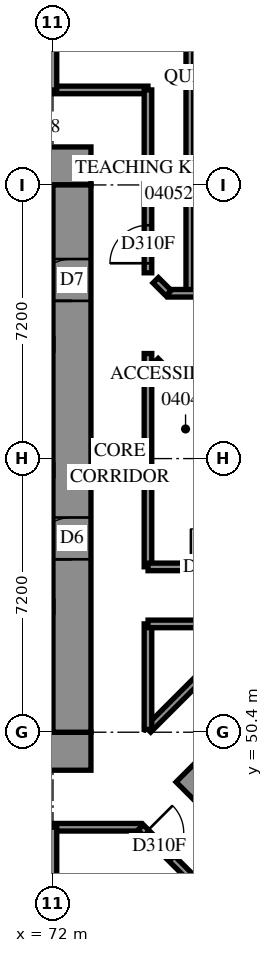
"""IFC4 building model, lengths in metres.
Left out: names, types, materials, properties, quantities, classifications, styles, units other than length and angle.
Written with IfcOpenShell. Run it as: python <this file> out.ifc"""

import sys

from ifc_helpers import new_model, si_unit, direction, frame, frame_2d, origin, place, context, subcontext, project, spatial, rectangle, extrude, element, fill, save


model = new_model("IFC4")
c1 = context("Model", 3, precision=1e-05, world=origin(), true_north=direction((0.0, 1.0)))
c2 = subcontext(c1, "Body", "Model", "MODEL_VIEW")
j1 = project(units=[si_unit("LENGTHUNIT", "METRE"), si_unit("PLANEANGLEUNIT", "RADIAN")], contexts=[c1])
p1 = place(None, origin())
s1 = spatial("IfcSite", under=j1, at=p1, CompositionType="ELEMENT")
p2 = place(p1, origin())
s2 = spatial("IfcBuilding", under=s1, at=p2, CompositionType="ELEMENT")
p3 = place(p2, frame((0.0, 0.0, 18.6)))
s3 = spatial("IfcBuildingStorey", under=s2, at=p3, CompositionType="ELEMENT", Elevation=18.6)
p4 = place(p3, frame((56.6, 49.9, -0.4), z_axis=(0.0, 0.0, 1.0), x_axis=(1.0, 0.0, 0.0)))
e1 = element("IfcWall", 1, at=p4, inside=s3, PredefinedType="SHEAR", context=c2, shape_type="SweptSolid", body=[
    extrude(rectangle(XDim=16.4, YDim=1.0, at=frame_2d((8.2, 0.0))), origin(), (0.0, 0.0, 1.0), 3.5),
])
p5 = place(p3, frame((56.6, 65.3, -0.4), z_axis=(0.0, 0.0, 1.0), x_axis=(1.0, 0.0, 0.0)))
e2 = element("IfcWall", 2, at=p5, inside=s3, PredefinedType="SHEAR", context=c2, shape_type="SweptSolid", body=[
    extrude(rectangle(XDim=16.4, YDim=1.0, at=frame_2d((8.2, 0.0))), origin(), (0.0, 0.0, 1.0), 3.5),
])
p6 = place(p5, frame((11.0, 0.0, 0.4)))
e3 = element("IfcOpeningElement", 3, at=p6, cuts=e2, PredefinedType="OPENING", context=c2, shape_type="SweptSolid", body=[
    extrude(rectangle(XDim=0.8, YDim=2.1, at=frame_2d((0.4, 1.05))), frame((0.0, 0.51, 0.0), z_axis=(0.0, -1.0, 0.0), x_axis=(1.0, 0.0, 0.0)), (0.0, 0.0, 1.0), 1.02),
])
p7 = place(p3, frame((72.5, 50.4, -0.4), z_axis=(0.0, 0.0, 1.0), x_axis=(0.0, 1.0, 0.0)))
e4 = element("IfcWall", 4, at=p7, inside=s3, PredefinedType="SHEAR", context=c2, shape_type="SweptSolid", body=[
    extrude(rectangle(XDim=14.4, YDim=1.0, at=frame_2d((7.2, 0.0))), origin(), (0.0, 0.0, 1.0), 3.5),
])
p8 = place(p7, frame((4.55, 0.0, 0.4)))
e5 = element("IfcOpeningElement", 5, at=p8, cuts=e4, PredefinedType="OPENING", context=c2, shape_type="SweptSolid", body=[
    extrude(rectangle(XDim=1.1, YDim=2.1, at=frame_2d((0.55, 1.05))), frame((0.0, 0.51, 0.0), z_axis=(0.0, -1.0, 0.0), x_axis=(1.0, 0.0, 0.0)), (0.0, 0.0, 1.0), 1.02),
])
p9 = place(p7, frame((11.35, 0.0, 0.4)))
e6 = element("IfcOpeningElement", 6, at=p9, cuts=e4, PredefinedType="OPENING", context=c2, shape_type="SweptSolid", body=[
    extrude(rectangle(XDim=1.1, YDim=2.1, at=frame_2d((0.55, 1.05))), frame((0.0, 0.51, 0.0), z_axis=(0.0, -1.0, 0.0), x_axis=(1.0, 0.0, 0.0)), (0.0, 0.0, 1.0), 1.02),
])
p10 = place(p3, frame((75.594, 49.443, -0.4), z_axis=(0.0, 0.0, 1.0), x_axis=(0.7071037324, -0.70710983, 0.0)))
e7 = element("IfcWall", 7, at=p10, inside=s3, PredefinedType="SHEAR", context=c2, shape_type="SweptSolid", body=[
    extrude(rectangle(XDim=16.4, YDim=1.0, at=frame_2d((8.2, 0.0))), origin(), (0.0, 0.0, 1.0), 3.5),
])
p11 = place(p3, frame((55.1, 67.3, 0.0), z_axis=(0.0, 0.0, 1.0), x_axis=(1.0, 0.0, 0.0)))
e8 = element("IfcWall", 8, at=p11, inside=s3, PredefinedType="PARTITIONING", context=c2, shape_type="SweptSolid", body=[
    extrude(rectangle(XDim=19.4, YDim=0.2, at=frame_2d((9.7, 0.0))), origin(), (0.0, 0.0, 1.0), 3.8),
])
p12 = place(p11, frame((6.058, 0.0, 0.0)))
e9 = element("IfcOpeningElement", 9, at=p12, cuts=e8, PredefinedType="OPENING", context=c2, shape_type="SweptSolid", body=[
    extrude(rectangle(XDim=1.0, YDim=2.1, at=frame_2d((0.5, 1.05))), frame((0.0, 0.11, 0.0), z_axis=(0.0, -1.0, 0.0), x_axis=(1.0, 0.0, 0.0)), (0.0, 0.0, 1.0), 0.22),
])
p13 = place(p11, frame((13.562, 0.0, 0.0)))
e10 = element("IfcOpeningElement", 10, at=p13, cuts=e8, PredefinedType="OPENING", context=c2, shape_type="SweptSolid", body=[
    extrude(rectangle(XDim=1.0, YDim=2.1, at=frame_2d((0.5, 1.05))), frame((0.0, 0.11, 0.0), z_axis=(0.0, -1.0, 0.0), x_axis=(1.0, 0.0, 0.0)), (0.0, 0.0, 1.0), 0.22),
])
p14 = place(p3, frame((55.1, 47.9, 0.0), z_axis=(0.0, 0.0, 1.0), x_axis=(1.0, 0.0, 0.0)))
e11 = element("IfcWall", 11, at=p14, inside=s3, PredefinedType="PARTITIONING", context=c2, shape_type="SweptSolid", body=[
    extrude(rectangle(XDim=19.208, YDim=0.2, at=frame_2d((9.604, 0.0))), origin(), (0.0, 0.0, 1.0), 3.8),
])
p15 = place(p14, frame((6.058, 0.0, 0.0)))
e12 = element("IfcOpeningElement", 12, at=p15, cuts=e11, PredefinedType="OPENING", context=c2, shape_type="SweptSolid", body=[
    extrude(rectangle(XDim=1.0, YDim=2.1, at=frame_2d((0.5, 1.05))), frame((0.0, 0.11, 0.0), z_axis=(0.0, -1.0, 0.0), x_axis=(1.0, 0.0, 0.0)), (0.0, 0.0, 1.0), 0.22),
])
p16 = place(p14, frame((13.258, 0.0, 0.0)))
e13 = element("IfcOpeningElement", 13, at=p16, cuts=e11, PredefinedType="OPENING", context=c2, shape_type="SweptSolid", body=[
    extrude(rectangle(XDim=1.0, YDim=2.1, at=frame_2d((0.5, 1.05))), frame((0.0, 0.11, 0.0), z_axis=(0.0, -1.0, 0.0), x_axis=(1.0, 0.0, 0.0)), (0.0, 0.0, 1.0), 0.22),
])
p17 = place(p3, frame((75.6, 61.95, 0.0), z_axis=(0.0, 0.0, 1.0), x_axis=(0.0, 1.0, 0.0)))
e14 = element("IfcWall", 14, at=p17, inside=s3, PredefinedType="PARTITIONING", context=c2, shape_type="SweptSolid", body=[
    extrude(rectangle(XDim=10.7, YDim=0.2, at=frame_2d((5.35, 0.0))), origin(), (0.0, 0.0, 1.0), 3.8),
])
p18 = place(p3, frame((74.5, 54.752, 0.0), z_axis=(0.0, 0.0, 1.0), x_axis=(0.0, 1.0, 0.0)))
e15 = element("IfcWall", 15, at=p18, inside=s3, PredefinedType="PARTITIONING", context=c2, shape_type="SweptSolid", body=[
    extrude(rectangle(XDim=5.612, YDim=0.2, at=frame_2d((2.806, 0.0))), origin(), (0.0, 0.0, 1.0), 3.8),
])
p19 = place(p3, frame((74.5, 62.488, 0.0), z_axis=(0.0, 0.0, 1.0), x_axis=(0.0, 1.0, 0.0)))
e16 = element("IfcWall", 16, at=p19, inside=s3, PredefinedType="PARTITIONING", context=c2, shape_type="SweptSolid", body=[
    extrude(rectangle(XDim=4.812, YDim=0.2, at=frame_2d((2.406, 0.0))), origin(), (0.0, 0.0, 1.0), 3.8),
])
p20 = place(p19, frame((0.252, 0.0, 0.0)))
e17 = element("IfcOpeningElement", 17, at=p20, cuts=e16, PredefinedType="OPENING", context=c2, shape_type="SweptSolid", body=[
    extrude(rectangle(XDim=1.0, YDim=2.1, at=frame_2d((0.5, 1.05))), frame((0.0, 0.11, 0.0), z_axis=(0.0, -1.0, 0.0), x_axis=(1.0, 0.0, 0.0)), (0.0, 0.0, 1.0), 0.22),
])
p21 = place(p3, frame((74.305, 47.897, 0.0), z_axis=(0.0, 0.0, 1.0), x_axis=(0.7071067812, -0.7071067812, 0.0)))
e18 = element("IfcWall", 18, at=p21, inside=s3, PredefinedType="PARTITIONING", context=c2, shape_type="SweptSolid", body=[
    extrude(rectangle(XDim=4.302, YDim=0.2, at=frame_2d((2.151, 0.0))), origin(), (0.0, 0.0, 1.0), 3.8),
])
p22 = place(p21, frame((0.192, 0.0, 0.0)))
e19 = element("IfcOpeningElement", 19, at=p22, cuts=e18, PredefinedType="OPENING", context=c2, shape_type="SweptSolid", body=[
    extrude(rectangle(XDim=1.0, YDim=2.1, at=frame_2d((0.5, 1.05))), frame((0.0, 0.11, 0.0), z_axis=(0.0, -1.0, 0.0), x_axis=(1.0, 0.0, 0.0)), (0.0, 0.0, 1.0), 0.22),
])
p23 = place(p3, frame((74.502, 54.75, 0.0), z_axis=(0.0, 0.0, 1.0), x_axis=(1.0, 0.0, 0.0)))
e20 = element("IfcWall", 20, at=p23, inside=s3, PredefinedType="PARTITIONING", context=c2, shape_type="SweptSolid", body=[
    extrude(rectangle(XDim=4.276, YDim=0.2, at=frame_2d((2.138, 0.0))), origin(), (0.0, 0.0, 1.0), 3.8),
])
p24 = place(p23, frame((1.129, 0.0, 0.0)))
e21 = element("IfcOpeningElement", 21, at=p24, cuts=e20, PredefinedType="OPENING", context=c2, shape_type="SweptSolid", body=[
    extrude(rectangle(XDim=1.0, YDim=2.1, at=frame_2d((0.5, 1.05))), frame((0.0, 0.11, 0.0), z_axis=(0.0, -1.0, 0.0), x_axis=(1.0, 0.0, 0.0)), (0.0, 0.0, 1.0), 0.22),
])
p25 = place(p3, frame((75.038, 61.95, 0.0), z_axis=(0.0, 0.0, 1.0), x_axis=(1.0, 0.0, 0.0)))
e22 = element("IfcWall", 22, at=p25, inside=s3, PredefinedType="PARTITIONING", context=c2, shape_type="SweptSolid", body=[
    extrude(rectangle(XDim=4.162, YDim=0.2, at=frame_2d((2.081, 0.0))), origin(), (0.0, 0.0, 1.0), 3.8),
])
p26 = place(p25, frame((1.129, 0.0, 0.0)))
e23 = element("IfcOpeningElement", 23, at=p26, cuts=e22, PredefinedType="OPENING", context=c2, shape_type="SweptSolid", body=[
    extrude(rectangle(XDim=1.0, YDim=2.1, at=frame_2d((0.5, 1.05))), frame((0.0, 0.11, 0.0), z_axis=(0.0, -1.0, 0.0), x_axis=(1.0, 0.0, 0.0)), (0.0, 0.0, 1.0), 0.22),
])
p27 = place(p3, frame((72.0, 67.3, 0.0), z_axis=(0.0, 0.0, 1.0), x_axis=(0.0, 1.0, 0.0)))
e24 = element("IfcWall", 24, at=p27, inside=s3, PredefinedType="PARTITIONING", context=c2, shape_type="SweptSolid", body=[
    extrude(rectangle(XDim=3.996, YDim=0.2, at=frame_2d((1.998, 0.0))), origin(), (0.0, 0.0, 1.0), 3.8),
])
p28 = place(p3, frame((72.0, 43.906, 0.0), z_axis=(0.0, 0.0, 1.0), x_axis=(0.0, 1.0, 0.0)))
e25 = element("IfcWall", 25, at=p28, inside=s3, PredefinedType="PARTITIONING", context=c2, shape_type="SweptSolid", body=[
    extrude(rectangle(XDim=3.994, YDim=0.2, at=frame_2d((1.997, 0.0))), origin(), (0.0, 0.0, 1.0), 3.8),
])
p29 = place(p3, frame((74.501, 50.473, 0.0), z_axis=(0.0, 0.0, 1.0), x_axis=(0.7071067812, 0.7071067812, 0.0)))
e26 = element("IfcWall", 26, at=p29, inside=s3, PredefinedType="PARTITIONING", context=c2, shape_type="SweptSolid", body=[
    extrude(rectangle(XDim=3.926, YDim=0.2, at=frame_2d((1.963, 0.0))), origin(), (0.0, 0.0, 1.0), 3.8),
])
p30 = place(p3, frame((74.697, 60.163, 0.0), z_axis=(0.0, 0.0, 1.0), x_axis=(0.7071067812, -0.7071067812, 0.0)))
e27 = element("IfcWall", 27, at=p30, inside=s3, PredefinedType="PARTITIONING", context=c2, shape_type="SweptSolid", body=[
    extrude(rectangle(XDim=3.748, YDim=0.2, at=frame_2d((1.874, 0.0))), origin(), (0.0, 0.0, 1.0), 3.8),
])
p31 = place(p3, frame((74.5, 50.474, 0.0), z_axis=(0.0, 0.0, 1.0), x_axis=(0.0, 1.0, 0.0)))
e28 = element("IfcWall", 28, at=p31, inside=s3, PredefinedType="PARTITIONING", context=c2, shape_type="SweptSolid", body=[
    extrude(rectangle(XDim=2.776, YDim=0.2, at=frame_2d((1.388, 0.0))), origin(), (0.0, 0.0, 1.0), 3.8),
])
p32 = place(p3, frame((74.502, 53.25, 0.0), z_axis=(0.0, 0.0, 1.0), x_axis=(1.0, 0.0, 0.0)))
e29 = element("IfcWall", 29, at=p32, inside=s3, PredefinedType="PARTITIONING", context=c2, shape_type="SweptSolid", body=[
    extrude(rectangle(XDim=2.774, YDim=0.2, at=frame_2d((1.387, 0.0))), origin(), (0.0, 0.0, 1.0), 3.8),
])
p33 = place(p3, frame((74.703, 62.291, 0.0), z_axis=(0.0, 0.0, 1.0), x_axis=(0.7071067812, -0.7071067812, 0.0)))
e30 = element("IfcWall", 30, at=p33, inside=s3, PredefinedType="PARTITIONING", context=c2, shape_type="SweptSolid", body=[
    extrude(rectangle(XDim=0.478, YDim=0.2, at=frame_2d((0.239, 0.0))), origin(), (0.0, 0.0, 1.0), 3.8),
])
p34 = place(p8, origin())
e31 = element("IfcDoor", 31, at=p34, inside=s3, OperationType="DOUBLE_DOOR_SINGLE_SWING", PredefinedType="DOOR", context=c2, shape_type="SweptSolid", body=[
    extrude(rectangle(XDim=1.1, YDim=2.1, at=frame_2d((0.55, 1.05))), frame((0.0, 0.025, 0.0), z_axis=(0.0, -1.0, 0.0), x_axis=(1.0, 0.0, 0.0)), (0.0, 0.0, 1.0), 0.05),
])
fill(e5, e31)
p35 = place(p9, origin())
e32 = element("IfcDoor", 32, at=p35, inside=s3, OperationType="SINGLE_SWING_RIGHT", PredefinedType="DOOR", context=c2, shape_type="SweptSolid", body=[
    extrude(rectangle(XDim=1.1, YDim=2.1, at=frame_2d((0.55, 1.05))), frame((0.0, 0.025, 0.0), z_axis=(0.0, -1.0, 0.0), x_axis=(1.0, 0.0, 0.0)), (0.0, 0.0, 1.0), 0.05),
])
fill(e6, e32)
p36 = place(p22, origin())
e33 = element("IfcDoor", 33, at=p36, inside=s3, OperationType="SINGLE_SWING_LEFT", PredefinedType="DOOR", context=c2, shape_type="SweptSolid", body=[
    extrude(rectangle(XDim=1.0, YDim=2.1, at=frame_2d((0.5, 1.05))), frame((0.0, 0.025, 0.0), z_axis=(0.0, -1.0, 0.0), x_axis=(1.0, 0.0, 0.0)), (0.0, 0.0, 1.0), 0.05),
])
fill(e19, e33)
p37 = place(p24, origin())
e34 = element("IfcDoor", 34, at=p37, inside=s3, OperationType="SINGLE_SWING_LEFT", PredefinedType="DOOR", context=c2, shape_type="SweptSolid", body=[
    extrude(rectangle(XDim=1.0, YDim=2.1, at=frame_2d((0.5, 1.05))), frame((0.0, 0.025, 0.0), z_axis=(0.0, -1.0, 0.0), x_axis=(1.0, 0.0, 0.0)), (0.0, 0.0, 1.0), 0.05),
])
fill(e21, e34)
p38 = place(p20, origin())
e35 = element("IfcDoor", 35, at=p38, inside=s3, OperationType="SINGLE_SWING_RIGHT", PredefinedType="DOOR", context=c2, shape_type="SweptSolid", body=[
    extrude(rectangle(XDim=1.0, YDim=2.1, at=frame_2d((0.5, 1.05))), frame((0.0, 0.025, 0.0), z_axis=(0.0, -1.0, 0.0), x_axis=(1.0, 0.0, 0.0)), (0.0, 0.0, 1.0), 0.05),
])
fill(e17, e35)
save(model, sys.argv[1])
